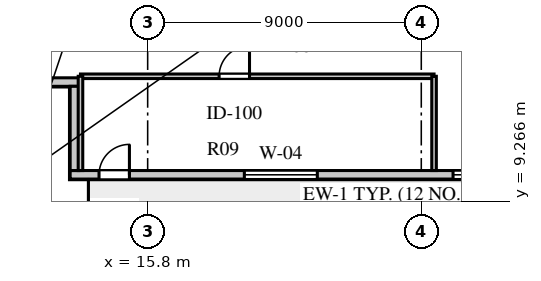
"""IFC4 building model, lengths in metres.
Left out: names, types, materials, properties, quantities, classifications, styles, units other than length and angle.
Written with IfcOpenShell. Run it as: python <this file> out.ifc"""

import sys

from ifc_helpers import new_model, si_unit, direction, frame, frame_2d, origin, place, context, subcontext, project, spatial, rectangle, extrude, element, fill, save


model = new_model("IFC4")
c1 = context("Model", 3, precision=1e-05, world=origin(), true_north=direction((0.0, 1.0)))
c2 = subcontext(c1, "Body", "Model", "MODEL_VIEW")
j1 = project(units=[si_unit("LENGTHUNIT", "METRE"), si_unit("PLANEANGLEUNIT", "RADIAN")], contexts=[c1])
p1 = place(None, origin())
s1 = spatial("IfcSite", under=j1, at=p1, CompositionType="ELEMENT")
p2 = place(p1, origin())
s2 = spatial("IfcBuilding", under=s1, at=p2, CompositionType="ELEMENT")
p3 = place(p2, frame((0.0, 0.0, 127.1)))
s3 = spatial("IfcBuildingStorey", under=s2, at=p3, CompositionType="ELEMENT", Elevation=127.1)
p4 = place(p3, frame((13.25, 10.14, 0.0), z_axis=(0.0, 0.0, 1.0), x_axis=(1.0, 0.0, 0.0)))
e1 = element("IfcWall", 1, at=p4, inside=s3, PredefinedType="STANDARD", context=c2, shape_type="SweptSolid", body=[
    extrude(rectangle(XDim=32.1, YDim=0.28, at=frame_2d((16.05, 0.0))), origin(), (0.0, 0.0, 1.0), 3.6),
])
p5 = place(p4, frame((0.95, 0.0, 0.0)))
e2 = element("IfcOpeningElement", 2, at=p5, cuts=e1, PredefinedType="OPENING", context=c2, shape_type="SweptSolid", body=[
    extrude(rectangle(XDim=1.0, YDim=2.05, at=frame_2d((0.5, 1.025))), frame((0.0, 0.15, 0.0), z_axis=(0.0, -1.0, 0.0), x_axis=(1.0, 0.0, 0.0)), (0.0, 0.0, 1.0), 0.3),
])
p6 = place(p4, frame((5.73, 0.0, 0.8)))
e3 = element("IfcOpeningElement", 3, at=p6, cuts=e1, PredefinedType="OPENING", context=c2, shape_type="SweptSolid", body=[
    extrude(rectangle(XDim=2.4, YDim=2.05, at=frame_2d((1.2, 1.025))), frame((0.0, 0.15, 0.0), z_axis=(0.0, -1.0, 0.0), x_axis=(1.0, 0.0, 0.0)), (0.0, 0.0, 1.0), 0.3),
])
p7 = place(p4, frame((12.595, 0.0, 0.8)))
e4 = element("IfcOpeningElement", 4, at=p7, cuts=e1, PredefinedType="OPENING", context=c2, shape_type="SweptSolid", body=[
    extrude(rectangle(XDim=1.2, YDim=1.75, at=frame_2d((0.6, 0.875))), frame((0.0, 0.15, 0.0), z_axis=(0.0, -1.0, 0.0), x_axis=(1.0, 0.0, 0.0)), (0.0, 0.0, 1.0), 0.3),
])
p8 = place(p4, frame((14.885, 0.0, 0.8)))
e5 = element("IfcOpeningElement", 5, at=p8, cuts=e1, PredefinedType="OPENING", context=c2, shape_type="SweptSolid", body=[
    extrude(rectangle(XDim=1.2, YDim=1.75, at=frame_2d((0.6, 0.875))), frame((0.0, 0.15, 0.0), z_axis=(0.0, -1.0, 0.0), x_axis=(1.0, 0.0, 0.0)), (0.0, 0.0, 1.0), 0.3),
])
p9 = place(p4, frame((17.46, 0.0, 0.8)))
e6 = element("IfcOpeningElement", 6, at=p9, cuts=e1, PredefinedType="OPENING", context=c2, shape_type="SweptSolid", body=[
    extrude(rectangle(XDim=1.65, YDim=1.95, at=frame_2d((0.825, 0.975))), frame((0.0, 0.15, 0.0), z_axis=(0.0, -1.0, 0.0), x_axis=(1.0, 0.0, 0.0)), (0.0, 0.0, 1.0), 0.3),
])
p10 = place(p4, frame((20.485, 0.0, 0.8)))
e7 = element("IfcOpeningElement", 7, at=p10, cuts=e1, PredefinedType="OPENING", context=c2, shape_type="SweptSolid", body=[
    extrude(rectangle(XDim=1.2, YDim=1.75, at=frame_2d((0.6, 0.875))), frame((0.0, 0.15, 0.0), z_axis=(0.0, -1.0, 0.0), x_axis=(1.0, 0.0, 0.0)), (0.0, 0.0, 1.0), 0.3),
])
p11 = place(p4, frame((22.63, 0.0, 0.8)))
e8 = element("IfcOpeningElement", 8, at=p11, cuts=e1, PredefinedType="OPENING", context=c2, shape_type="SweptSolid", body=[
    extrude(rectangle(XDim=2.25, YDim=2.0, at=frame_2d((1.125, 1.0))), frame((0.0, 0.15, 0.0), z_axis=(0.0, -1.0, 0.0), x_axis=(1.0, 0.0, 0.0)), (0.0, 0.0, 1.0), 0.3),
])
p12 = place(p4, frame((25.865, 0.0, 0.8)))
e9 = element("IfcOpeningElement", 9, at=p12, cuts=e1, PredefinedType="OPENING", context=c2, shape_type="SweptSolid", body=[
    extrude(rectangle(XDim=1.2, YDim=1.75, at=frame_2d((0.6, 0.875))), frame((0.0, 0.15, 0.0), z_axis=(0.0, -1.0, 0.0), x_axis=(1.0, 0.0, 0.0)), (0.0, 0.0, 1.0), 0.3),
])
p13 = place(p4, frame((29.03, 0.0, 0.8)))
e10 = element("IfcOpeningElement", 10, at=p13, cuts=e1, PredefinedType="OPENING", context=c2, shape_type="SweptSolid", body=[
    extrude(rectangle(XDim=1.5, YDim=2.0, at=frame_2d((0.75, 1.0))), frame((0.0, 0.15, 0.0), z_axis=(0.0, -1.0, 0.0), x_axis=(1.0, 0.0, 0.0)), (0.0, 0.0, 1.0), 0.3),
])
p14 = place(p3, frame((10.2, 13.19, 0.0), z_axis=(0.0, 0.0, 1.0), x_axis=(1.0, 0.0, 0.0)))
e11 = element("IfcWall", 11, at=p14, inside=s3, PredefinedType="STANDARD", context=c2, shape_type="SweptSolid", body=[
    extrude(rectangle(XDim=3.33, YDim=0.28, at=frame_2d((1.665, 0.0))), origin(), (0.0, 0.0, 1.0), 3.6),
])
p15 = place(p3, frame((13.39, 13.05, 0.0), z_axis=(0.0, 0.0, 1.0), x_axis=(0.0, -1.0, 0.0)))
e12 = element("IfcWall", 12, at=p15, inside=s3, PredefinedType="STANDARD", context=c2, shape_type="SweptSolid", body=[
    extrude(rectangle(XDim=2.77, YDim=0.28, at=frame_2d((1.385, 0.0))), origin(), (0.0, 0.0, 1.0), 3.6),
])
p16 = place(p3, frame((13.59, 13.38, 0.0), z_axis=(0.0, 0.0, 1.0), x_axis=(1.0, 0.0, 0.0)))
e13 = element("IfcWall", 13, at=p16, inside=s3, PredefinedType="PARTITIONING", context=c2, shape_type="SweptSolid", body=[
    extrude(rectangle(XDim=11.63, YDim=0.15, at=frame_2d((5.815, 0.0))), origin(), (0.0, 0.0, 1.0), 3.6),
])
p17 = place(p16, frame((4.56, 0.0, 0.0)))
e14 = element("IfcOpeningElement", 14, at=p17, cuts=e13, PredefinedType="OPENING", context=c2, shape_type="SweptSolid", body=[
    extrude(rectangle(XDim=1.0, YDim=2.08, at=frame_2d((0.5, 1.04))), frame((0.0, 0.085, 0.0), z_axis=(0.0, -1.0, 0.0), x_axis=(1.0, 0.0, 0.0)), (0.0, 0.0, 1.0), 0.17),
])
p18 = place(p3, frame((13.59, 10.28, 0.0), z_axis=(0.0, 0.0, 1.0), x_axis=(0.0, 1.0, 0.0)))
e15 = element("IfcWall", 15, at=p18, inside=s3, PredefinedType="PARTITIONING", context=c2, shape_type="SweptSolid", body=[
    extrude(rectangle(XDim=3.1, YDim=0.15, at=frame_2d((1.55, 0.0))), origin(), (0.0, 0.0, 1.0), 3.6),
])
p19 = place(p3, frame((25.22, 10.28, 0.0), z_axis=(0.0, 0.0, 1.0), x_axis=(0.0, 1.0, 0.0)))
e16 = element("IfcWall", 16, at=p19, inside=s3, PredefinedType="PARTITIONING", context=c2, shape_type="SweptSolid", body=[
    extrude(rectangle(XDim=3.1, YDim=0.15, at=frame_2d((1.55, 0.0))), origin(), (0.0, 0.0, 1.0), 3.1),
])
p20 = place(p5, frame((1.0, 0.0, 0.0), z_axis=(0.0, 0.0, 1.0), x_axis=(-1.0, 0.0, 0.0)))
e17 = element("IfcDoor", 17, at=p20, inside=s3, OperationType="SINGLE_SWING_LEFT", PredefinedType="DOOR", context=c2, shape_type="SweptSolid", body=[
    extrude(rectangle(XDim=1.0, YDim=2.05, at=frame_2d((0.5, 1.025))), frame((0.0, 0.025, 0.0), z_axis=(0.0, -1.0, 0.0), x_axis=(1.0, 0.0, 0.0)), (0.0, 0.0, 1.0), 0.05),
])
fill(e2, e17)
p21 = place(p6, origin())
e18 = element("IfcWindow", 18, at=p21, inside=s3, PartitioningType="SINGLE_PANEL", PredefinedType="WINDOW", context=c2, shape_type="SweptSolid", body=[
    extrude(rectangle(XDim=2.4, YDim=2.05, at=frame_2d((1.2, 1.025))), frame((0.0, 0.03, 0.0), z_axis=(0.0, -1.0, 0.0), x_axis=(1.0, 0.0, 0.0)), (0.0, 0.0, 1.0), 0.06),
])
fill(e3, e18)
p22 = place(p7, origin())
e19 = element("IfcWindow", 19, at=p22, inside=s3, PartitioningType="SINGLE_PANEL", PredefinedType="WINDOW", context=c2, shape_type="SweptSolid", body=[
    extrude(rectangle(XDim=1.2, YDim=1.75, at=frame_2d((0.6, 0.875))), frame((0.0, 0.03, 0.0), z_axis=(0.0, -1.0, 0.0), x_axis=(1.0, 0.0, 0.0)), (0.0, 0.0, 1.0), 0.06),
])
fill(e4, e19)
p23 = place(p17, frame((1.0, 0.0, 0.0), z_axis=(0.0, 0.0, 1.0), x_axis=(-1.0, 0.0, 0.0)))
e20 = element("IfcDoor", 20, at=p23, inside=s3, OperationType="SINGLE_SWING_LEFT", PredefinedType="DOOR", context=c2, shape_type="SweptSolid", body=[
    extrude(rectangle(XDim=1.0, YDim=2.08, at=frame_2d((0.5, 1.04))), frame((0.0, 0.025, 0.0), z_axis=(0.0, -1.0, 0.0), x_axis=(1.0, 0.0, 0.0)), (0.0, 0.0, 1.0), 0.05),
])
fill(e14, e20)
save(model, sys.argv[1])
